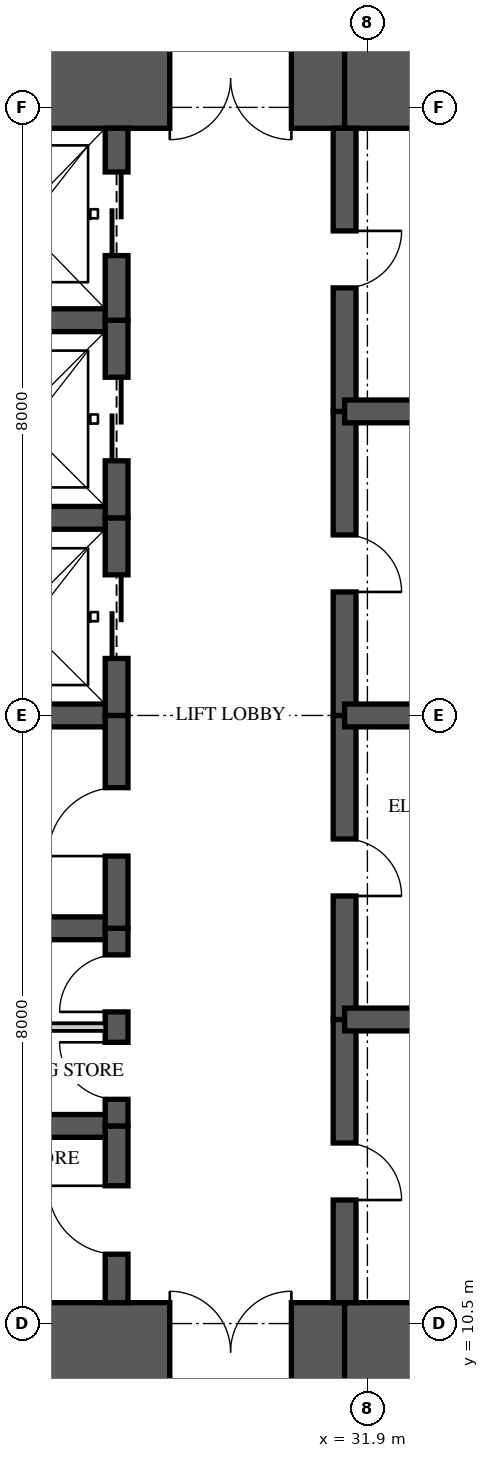
"""IFC4 building model, lengths in metres.
Left out: names, types, materials, properties, quantities, classifications, styles, units other than length and angle.
Written with IfcOpenShell. Run it as: python <this file> out.ifc"""

import sys

from ifc_helpers import new_model, si_unit, direction, frame, frame_2d, origin, place, context, subcontext, project, spatial, rectangle, extrude, element, fill, save


model = new_model("IFC4")
c1 = context("Model", 3, precision=1e-05, world=origin(), true_north=direction((0.0, 1.0)))
c2 = subcontext(c1, "Body", "Model", "MODEL_VIEW")
j1 = project(units=[si_unit("LENGTHUNIT", "METRE"), si_unit("PLANEANGLEUNIT", "RADIAN")], contexts=[c1])
p1 = place(None, origin())
s1 = spatial("IfcSite", under=j1, at=p1, CompositionType="ELEMENT")
p2 = place(p1, origin())
s2 = spatial("IfcBuilding", under=s1, at=p2, CompositionType="ELEMENT")
p3 = place(p2, frame((0.0, 0.0, 197.9)))
s3 = spatial("IfcBuildingStorey", under=s2, at=p3, CompositionType="ELEMENT", Elevation=197.9)
p4 = place(p3, frame((26.0, 10.125, 0.0), z_axis=(0.0, 0.0, 1.0), x_axis=(1.0, 0.0, 0.0)))
e1 = element("IfcWall", 1, at=p4, inside=s3, PredefinedType="SHEAR", context=c2, shape_type="SweptSolid", body=[
    extrude(rectangle(XDim=5.6, YDim=1.3, at=frame_2d((2.8, 0.0))), origin(), (0.0, 0.0, 1.0), 3.35),
])
p5 = place(p4, frame((3.3, 0.0, 0.0)))
e2 = element("IfcOpeningElement", 2, at=p5, cuts=e1, PredefinedType="OPENING", context=c2, shape_type="SweptSolid", body=[
    extrude(rectangle(XDim=1.6, YDim=2.1, at=frame_2d((0.8, 1.05))), frame((0.0, 0.66, 0.0), z_axis=(0.0, -1.0, 0.0), x_axis=(1.0, 0.0, 0.0)), (0.0, 0.0, 1.0), 1.32),
])
for number, where, z_axis, x_axis in (
    (3, (31.6, 10.125, 0.0), (0.0, 0.0, 1.0), (1.0, 0.0, 0.0)),
    (4, (35.9, 26.875, 0.0), (0.0, 0.0, 1.0), (-1.0, 0.0, 0.0)),
):
    element("IfcWall", number, at=place(p3, frame(where, z_axis=z_axis, x_axis=x_axis)), inside=s3, PredefinedType="SHEAR", context=c2, shape_type="SweptSolid", body=[
        extrude(rectangle(XDim=4.3, YDim=1.3, at=frame_2d((2.15, 0.0))), origin(), (0.0, 0.0, 1.0), 3.35),
    ])
p6 = place(p3, frame((31.6, 26.875, 0.0), z_axis=(0.0, 0.0, 1.0), x_axis=(-1.0, 0.0, 0.0)))
e5 = element("IfcWall", 5, at=p6, inside=s3, PredefinedType="SHEAR", context=c2, shape_type="SweptSolid", body=[
    extrude(rectangle(XDim=5.6, YDim=1.3, at=frame_2d((2.8, 0.0))), origin(), (0.0, 0.0, 1.0), 3.35),
])
p7 = place(p6, frame((0.7, 0.0, 0.0)))
e6 = element("IfcOpeningElement", 6, at=p7, cuts=e5, PredefinedType="OPENING", context=c2, shape_type="SweptSolid", body=[
    extrude(rectangle(XDim=1.6, YDim=2.1, at=frame_2d((0.8, 1.05))), frame((0.0, 0.66, 0.0), z_axis=(0.0, -1.0, 0.0), x_axis=(1.0, 0.0, 0.0)), (0.0, 0.0, 1.0), 1.32),
])
p8 = place(p3, frame((28.6, 10.775, 0.0), z_axis=(0.0, 0.0, 1.0), x_axis=(0.0, 1.0, 0.0)))
e7 = element("IfcWall", 7, at=p8, inside=s3, PredefinedType="SHEAR", context=c2, shape_type="SweptSolid", body=[
    extrude(rectangle(XDim=2.325, YDim=0.3, at=frame_2d((1.163, 0.0))), origin(), (0.0, 0.0, 1.0), 3.35),
])
p9 = place(p8, frame((0.637, 0.0, 0.0)))
e8 = element("IfcOpeningElement", 8, at=p9, cuts=e7, PredefinedType="OPENING", context=c2, shape_type="SweptSolid", body=[
    extrude(rectangle(XDim=0.9, YDim=2.1, at=frame_2d((0.45, 1.05))), frame((0.0, 0.16, 0.0), z_axis=(0.0, -1.0, 0.0), x_axis=(1.0, 0.0, 0.0)), (0.0, 0.0, 1.0), 0.32),
])
p10 = place(p3, frame((28.6, 13.1, 0.0), z_axis=(0.0, 0.0, 1.0), x_axis=(0.0, 1.0, 0.0)))
e9 = element("IfcWall", 9, at=p10, inside=s3, PredefinedType="SHEAR", context=c2, shape_type="SweptSolid", body=[
    extrude(rectangle(XDim=2.6, YDim=0.3, at=frame_2d((1.3, 0.0))), origin(), (0.0, 0.0, 1.0), 3.35),
])
p11 = place(p10, frame((0.35, 0.0, 0.0)))
e10 = element("IfcOpeningElement", 10, at=p11, cuts=e9, PredefinedType="OPENING", context=c2, shape_type="SweptSolid", body=[
    extrude(rectangle(XDim=0.75, YDim=2.1, at=frame_2d((0.375, 1.05))), frame((0.0, 0.16, 0.0), z_axis=(0.0, -1.0, 0.0), x_axis=(1.0, 0.0, 0.0)), (0.0, 0.0, 1.0), 0.32),
])
p12 = place(p10, frame((1.5, 0.0, 0.0)))
e11 = element("IfcOpeningElement", 11, at=p12, cuts=e9, PredefinedType="OPENING", context=c2, shape_type="SweptSolid", body=[
    extrude(rectangle(XDim=0.75, YDim=2.1, at=frame_2d((0.375, 1.05))), frame((0.0, 0.16, 0.0), z_axis=(0.0, -1.0, 0.0), x_axis=(1.0, 0.0, 0.0)), (0.0, 0.0, 1.0), 0.32),
])
p13 = place(p3, frame((28.6, 15.7, 0.0), z_axis=(0.0, 0.0, 1.0), x_axis=(0.0, 1.0, 0.0)))
e12 = element("IfcWall", 12, at=p13, inside=s3, PredefinedType="SHEAR", context=c2, shape_type="SweptSolid", body=[
    extrude(rectangle(XDim=2.8, YDim=0.3, at=frame_2d((1.4, 0.0))), origin(), (0.0, 0.0, 1.0), 3.35),
])
p14 = place(p13, frame((0.95, 0.0, 0.0)))
e13 = element("IfcOpeningElement", 13, at=p14, cuts=e12, PredefinedType="OPENING", context=c2, shape_type="SweptSolid", body=[
    extrude(rectangle(XDim=0.9, YDim=2.1, at=frame_2d((0.45, 1.05))), frame((0.0, 0.16, 0.0), z_axis=(0.0, -1.0, 0.0), x_axis=(1.0, 0.0, 0.0)), (0.0, 0.0, 1.0), 0.32),
])
p15 = place(p3, frame((28.6, 18.5, 0.0), z_axis=(0.0, 0.0, 1.0), x_axis=(0.0, 1.0, 0.0)))
e14 = element("IfcWall", 14, at=p15, inside=s3, PredefinedType="SHEAR", context=c2, shape_type="SweptSolid", body=[
    extrude(rectangle(XDim=2.6, YDim=0.3, at=frame_2d((1.3, 0.0))), origin(), (0.0, 0.0, 1.0), 3.35),
])
p16 = place(p15, frame((0.75, 0.0, 0.0)))
e15 = element("IfcOpeningElement", 15, at=p16, cuts=e14, PredefinedType="OPENING", context=c2, shape_type="SweptSolid", body=[
    extrude(rectangle(XDim=1.1, YDim=2.1, at=frame_2d((0.55, 1.05))), frame((0.0, 0.16, 0.0), z_axis=(0.0, -1.0, 0.0), x_axis=(1.0, 0.0, 0.0)), (0.0, 0.0, 1.0), 0.32),
])
p17 = place(p3, frame((28.6, 21.1, 0.0), z_axis=(0.0, 0.0, 1.0), x_axis=(0.0, 1.0, 0.0)))
e16 = element("IfcWall", 16, at=p17, inside=s3, PredefinedType="SHEAR", context=c2, shape_type="SweptSolid", body=[
    extrude(rectangle(XDim=2.6, YDim=0.3, at=frame_2d((1.3, 0.0))), origin(), (0.0, 0.0, 1.0), 3.35),
])
p18 = place(p17, frame((0.75, 0.0, 0.0)))
e17 = element("IfcOpeningElement", 17, at=p18, cuts=e16, PredefinedType="OPENING", context=c2, shape_type="SweptSolid", body=[
    extrude(rectangle(XDim=1.1, YDim=2.1, at=frame_2d((0.55, 1.05))), frame((0.0, 0.16, 0.0), z_axis=(0.0, -1.0, 0.0), x_axis=(1.0, 0.0, 0.0)), (0.0, 0.0, 1.0), 0.32),
])
p19 = place(p3, frame((28.6, 23.7, 0.0), z_axis=(0.0, 0.0, 1.0), x_axis=(0.0, 1.0, 0.0)))
e18 = element("IfcWall", 18, at=p19, inside=s3, PredefinedType="SHEAR", context=c2, shape_type="SweptSolid", body=[
    extrude(rectangle(XDim=2.525, YDim=0.3, at=frame_2d((1.263, 0.0))), origin(), (0.0, 0.0, 1.0), 3.35),
])
p20 = place(p19, frame((0.85, 0.0, 0.0)))
e19 = element("IfcOpeningElement", 19, at=p20, cuts=e18, PredefinedType="OPENING", context=c2, shape_type="SweptSolid", body=[
    extrude(rectangle(XDim=1.1, YDim=2.1, at=frame_2d((0.55, 1.05))), frame((0.0, 0.16, 0.0), z_axis=(0.0, -1.0, 0.0), x_axis=(1.0, 0.0, 0.0)), (0.0, 0.0, 1.0), 0.32),
])
p21 = place(p3, frame((31.6, 10.775, 0.0), z_axis=(0.0, 0.0, 1.0), x_axis=(0.0, 1.0, 0.0)))
e20 = element("IfcWall", 20, at=p21, inside=s3, PredefinedType="SHEAR", context=c2, shape_type="SweptSolid", body=[
    extrude(rectangle(XDim=3.725, YDim=0.3, at=frame_2d((1.863, 0.0))), origin(), (0.0, 0.0, 1.0), 3.35),
])
p22 = place(p21, frame((1.35, 0.0, 0.0)))
e21 = element("IfcOpeningElement", 21, at=p22, cuts=e20, PredefinedType="OPENING", context=c2, shape_type="SweptSolid", body=[
    extrude(rectangle(XDim=0.75, YDim=2.1, at=frame_2d((0.375, 1.05))), frame((0.0, 0.16, 0.0), z_axis=(0.0, -1.0, 0.0), x_axis=(1.0, 0.0, 0.0)), (0.0, 0.0, 1.0), 0.32),
])
p23 = place(p3, frame((31.6, 14.5, 0.0), z_axis=(0.0, 0.0, 1.0), x_axis=(0.0, 1.0, 0.0)))
e22 = element("IfcWall", 22, at=p23, inside=s3, PredefinedType="SHEAR", context=c2, shape_type="SweptSolid", body=[
    extrude(rectangle(XDim=4.0, YDim=0.3, at=frame_2d((2.0, 0.0))), origin(), (0.0, 0.0, 1.0), 3.35),
])
p24 = place(p23, frame((1.625, 0.0, 0.0)))
e23 = element("IfcOpeningElement", 23, at=p24, cuts=e22, PredefinedType="OPENING", context=c2, shape_type="SweptSolid", body=[
    extrude(rectangle(XDim=0.75, YDim=2.1, at=frame_2d((0.375, 1.05))), frame((0.0, 0.16, 0.0), z_axis=(0.0, -1.0, 0.0), x_axis=(1.0, 0.0, 0.0)), (0.0, 0.0, 1.0), 0.32),
])
p25 = place(p3, frame((31.6, 18.5, 0.0), z_axis=(0.0, 0.0, 1.0), x_axis=(0.0, 1.0, 0.0)))
e24 = element("IfcWall", 24, at=p25, inside=s3, PredefinedType="SHEAR", context=c2, shape_type="SweptSolid", body=[
    extrude(rectangle(XDim=4.0, YDim=0.3, at=frame_2d((2.0, 0.0))), origin(), (0.0, 0.0, 1.0), 3.35),
])
p26 = place(p25, frame((1.625, 0.0, 0.0)))
e25 = element("IfcOpeningElement", 25, at=p26, cuts=e24, PredefinedType="OPENING", context=c2, shape_type="SweptSolid", body=[
    extrude(rectangle(XDim=0.75, YDim=2.1, at=frame_2d((0.375, 1.05))), frame((0.0, 0.16, 0.0), z_axis=(0.0, -1.0, 0.0), x_axis=(1.0, 0.0, 0.0)), (0.0, 0.0, 1.0), 0.32),
])
p27 = place(p3, frame((31.6, 22.5, 0.0), z_axis=(0.0, 0.0, 1.0), x_axis=(0.0, 1.0, 0.0)))
e26 = element("IfcWall", 26, at=p27, inside=s3, PredefinedType="SHEAR", context=c2, shape_type="SweptSolid", body=[
    extrude(rectangle(XDim=3.725, YDim=0.3, at=frame_2d((1.863, 0.0))), origin(), (0.0, 0.0, 1.0), 3.35),
])
p28 = place(p27, frame((1.625, 0.0, 0.0)))
e27 = element("IfcOpeningElement", 27, at=p28, cuts=e26, PredefinedType="OPENING", context=c2, shape_type="SweptSolid", body=[
    extrude(rectangle(XDim=0.75, YDim=2.1, at=frame_2d((0.375, 1.05))), frame((0.0, 0.16, 0.0), z_axis=(0.0, -1.0, 0.0), x_axis=(1.0, 0.0, 0.0)), (0.0, 0.0, 1.0), 0.32),
])
for number, where, z_axis, x_axis in (
    (28, (26.0, 13.1, 0.0), (0.0, 0.0, 1.0), (1.0, 0.0, 0.0)),
    (29, (26.0, 15.7, 0.0), (0.0, 0.0, 1.0), (1.0, 0.0, 0.0)),
    (30, (26.0, 18.5, 0.0), (0.0, 0.0, 1.0), (1.0, 0.0, 0.0)),
    (31, (26.0, 21.1, 0.0), (0.0, 0.0, 1.0), (1.0, 0.0, 0.0)),
    (32, (26.0, 23.7, 0.0), (0.0, 0.0, 1.0), (1.0, 0.0, 0.0)),
):
    element("IfcWall", number, at=place(p3, frame(where, z_axis=z_axis, x_axis=x_axis)), inside=s3, PredefinedType="SHEAR", context=c2, shape_type="SweptSolid", body=[
        extrude(rectangle(XDim=2.6, YDim=0.3, at=frame_2d((1.3, 0.0))), origin(), (0.0, 0.0, 1.0), 3.35),
    ])
for number, where, z_axis, x_axis in (
    (33, (31.6, 14.5, 0.0), (0.0, 0.0, 1.0), (1.0, 0.0, 0.0)),
    (34, (31.6, 18.5, 0.0), (0.0, 0.0, 1.0), (1.0, 0.0, 0.0)),
    (35, (31.6, 22.5, 0.0), (0.0, 0.0, 1.0), (1.0, 0.0, 0.0)),
):
    element("IfcWall", number, at=place(p3, frame(where, z_axis=z_axis, x_axis=x_axis)), inside=s3, PredefinedType="SHEAR", context=c2, shape_type="SweptSolid", body=[
        extrude(rectangle(XDim=4.3, YDim=0.3, at=frame_2d((2.15, 0.0))), origin(), (0.0, 0.0, 1.0), 3.35),
    ])
p29 = place(p3, frame((26.15, 14.4, 0.0), z_axis=(0.0, 0.0, 1.0), x_axis=(1.0, 0.0, 0.0)))
e36 = element("IfcWall", 36, at=p29, inside=s3, PredefinedType="PARTITIONING", context=c2, shape_type="SweptSolid", body=[
    extrude(rectangle(XDim=2.3, YDim=0.1, at=frame_2d((1.15, 0.0))), origin(), (0.0, 0.0, 1.0), 3.11),
])
p30 = place(p16, origin())
e37 = element("IfcDoor", 37, at=p30, inside=s3, OperationType="SLIDING_TO_LEFT", PredefinedType="DOOR", context=c2, shape_type="SweptSolid", body=[
    extrude(rectangle(XDim=1.1, YDim=2.1, at=frame_2d((0.55, 1.05))), frame((0.0, 0.025, 0.0), z_axis=(0.0, -1.0, 0.0), x_axis=(1.0, 0.0, 0.0)), (0.0, 0.0, 1.0), 0.05),
])
fill(e15, e37)
p31 = place(p18, origin())
e38 = element("IfcDoor", 38, at=p31, inside=s3, OperationType="SLIDING_TO_LEFT", PredefinedType="DOOR", context=c2, shape_type="SweptSolid", body=[
    extrude(rectangle(XDim=1.1, YDim=2.1, at=frame_2d((0.55, 1.05))), frame((0.0, 0.025, 0.0), z_axis=(0.0, -1.0, 0.0), x_axis=(1.0, 0.0, 0.0)), (0.0, 0.0, 1.0), 0.05),
])
fill(e17, e38)
p32 = place(p20, origin())
e39 = element("IfcDoor", 39, at=p32, inside=s3, OperationType="SLIDING_TO_LEFT", PredefinedType="DOOR", context=c2, shape_type="SweptSolid", body=[
    extrude(rectangle(XDim=1.1, YDim=2.1, at=frame_2d((0.55, 1.05))), frame((0.0, 0.025, 0.0), z_axis=(0.0, -1.0, 0.0), x_axis=(1.0, 0.0, 0.0)), (0.0, 0.0, 1.0), 0.05),
])
fill(e19, e39)
p33 = place(p9, origin())
e40 = element("IfcDoor", 40, at=p33, inside=s3, OperationType="SINGLE_SWING_RIGHT", PredefinedType="DOOR", context=c2, shape_type="SweptSolid", body=[
    extrude(rectangle(XDim=0.9, YDim=2.1, at=frame_2d((0.45, 1.05))), frame((0.0, 0.025, 0.0), z_axis=(0.0, -1.0, 0.0), x_axis=(1.0, 0.0, 0.0)), (0.0, 0.0, 1.0), 0.05),
])
fill(e8, e40)
p34 = place(p11, origin())
e41 = element("IfcDoor", 41, at=p34, inside=s3, OperationType="SINGLE_SWING_RIGHT", PredefinedType="DOOR", context=c2, shape_type="SweptSolid", body=[
    extrude(rectangle(XDim=0.75, YDim=2.1, at=frame_2d((0.375, 1.05))), frame((0.0, 0.025, 0.0), z_axis=(0.0, -1.0, 0.0), x_axis=(1.0, 0.0, 0.0)), (0.0, 0.0, 1.0), 0.05),
])
fill(e10, e41)
p35 = place(p12, origin())
e42 = element("IfcDoor", 42, at=p35, inside=s3, OperationType="SINGLE_SWING_LEFT", PredefinedType="DOOR", context=c2, shape_type="SweptSolid", body=[
    extrude(rectangle(XDim=0.75, YDim=2.1, at=frame_2d((0.375, 1.05))), frame((0.0, 0.025, 0.0), z_axis=(0.0, -1.0, 0.0), x_axis=(1.0, 0.0, 0.0)), (0.0, 0.0, 1.0), 0.05),
])
fill(e11, e42)
p36 = place(p14, origin())
e43 = element("IfcDoor", 43, at=p36, inside=s3, OperationType="SINGLE_SWING_LEFT", PredefinedType="DOOR", context=c2, shape_type="SweptSolid", body=[
    extrude(rectangle(XDim=0.9, YDim=2.1, at=frame_2d((0.45, 1.05))), frame((0.0, 0.025, 0.0), z_axis=(0.0, -1.0, 0.0), x_axis=(1.0, 0.0, 0.0)), (0.0, 0.0, 1.0), 0.05),
])
fill(e13, e43)
p37 = place(p5, origin())
e44 = element("IfcDoor", 44, at=p37, inside=s3, OperationType="DOUBLE_DOOR_SINGLE_SWING", PredefinedType="DOOR", context=c2, shape_type="SweptSolid", body=[
    extrude(rectangle(XDim=1.6, YDim=2.1, at=frame_2d((0.8, 1.05))), frame((0.0, 0.025, 0.0), z_axis=(0.0, -1.0, 0.0), x_axis=(1.0, 0.0, 0.0)), (0.0, 0.0, 1.0), 0.05),
])
fill(e2, e44)
p38 = place(p7, origin())
e45 = element("IfcDoor", 45, at=p38, inside=s3, OperationType="DOUBLE_DOOR_SINGLE_SWING", PredefinedType="DOOR", context=c2, shape_type="SweptSolid", body=[
    extrude(rectangle(XDim=1.6, YDim=2.1, at=frame_2d((0.8, 1.05))), frame((0.0, 0.025, 0.0), z_axis=(0.0, -1.0, 0.0), x_axis=(1.0, 0.0, 0.0)), (0.0, 0.0, 1.0), 0.05),
])
fill(e6, e45)
p39 = place(p22, frame((0.75, 0.0, 0.0), z_axis=(0.0, 0.0, 1.0), x_axis=(-1.0, 0.0, 0.0)))
e46 = element("IfcDoor", 46, at=p39, inside=s3, OperationType="SINGLE_SWING_RIGHT", PredefinedType="DOOR", context=c2, shape_type="SweptSolid", body=[
    extrude(rectangle(XDim=0.75, YDim=2.1, at=frame_2d((0.375, 1.05))), frame((0.0, 0.025, 0.0), z_axis=(0.0, -1.0, 0.0), x_axis=(1.0, 0.0, 0.0)), (0.0, 0.0, 1.0), 0.05),
])
fill(e21, e46)
p40 = place(p24, frame((0.75, 0.0, 0.0), z_axis=(0.0, 0.0, 1.0), x_axis=(-1.0, 0.0, 0.0)))
e47 = element("IfcDoor", 47, at=p40, inside=s3, OperationType="SINGLE_SWING_RIGHT", PredefinedType="DOOR", context=c2, shape_type="SweptSolid", body=[
    extrude(rectangle(XDim=0.75, YDim=2.1, at=frame_2d((0.375, 1.05))), frame((0.0, 0.025, 0.0), z_axis=(0.0, -1.0, 0.0), x_axis=(1.0, 0.0, 0.0)), (0.0, 0.0, 1.0), 0.05),
])
fill(e23, e47)
p41 = place(p26, frame((0.75, 0.0, 0.0), z_axis=(0.0, 0.0, 1.0), x_axis=(-1.0, 0.0, 0.0)))
e48 = element("IfcDoor", 48, at=p41, inside=s3, OperationType="SINGLE_SWING_RIGHT", PredefinedType="DOOR", context=c2, shape_type="SweptSolid", body=[
    extrude(rectangle(XDim=0.75, YDim=2.1, at=frame_2d((0.375, 1.05))), frame((0.0, 0.025, 0.0), z_axis=(0.0, -1.0, 0.0), x_axis=(1.0, 0.0, 0.0)), (0.0, 0.0, 1.0), 0.05),
])
fill(e25, e48)
p42 = place(p28, frame((0.75, 0.0, 0.0), z_axis=(0.0, 0.0, 1.0), x_axis=(-1.0, 0.0, 0.0)))
e49 = element("IfcDoor", 49, at=p42, inside=s3, OperationType="SINGLE_SWING_LEFT", PredefinedType="DOOR", context=c2, shape_type="SweptSolid", body=[
    extrude(rectangle(XDim=0.75, YDim=2.1, at=frame_2d((0.375, 1.05))), frame((0.0, 0.025, 0.0), z_axis=(0.0, -1.0, 0.0), x_axis=(1.0, 0.0, 0.0)), (0.0, 0.0, 1.0), 0.05),
])
fill(e27, e49)
save(model, sys.argv[1])
